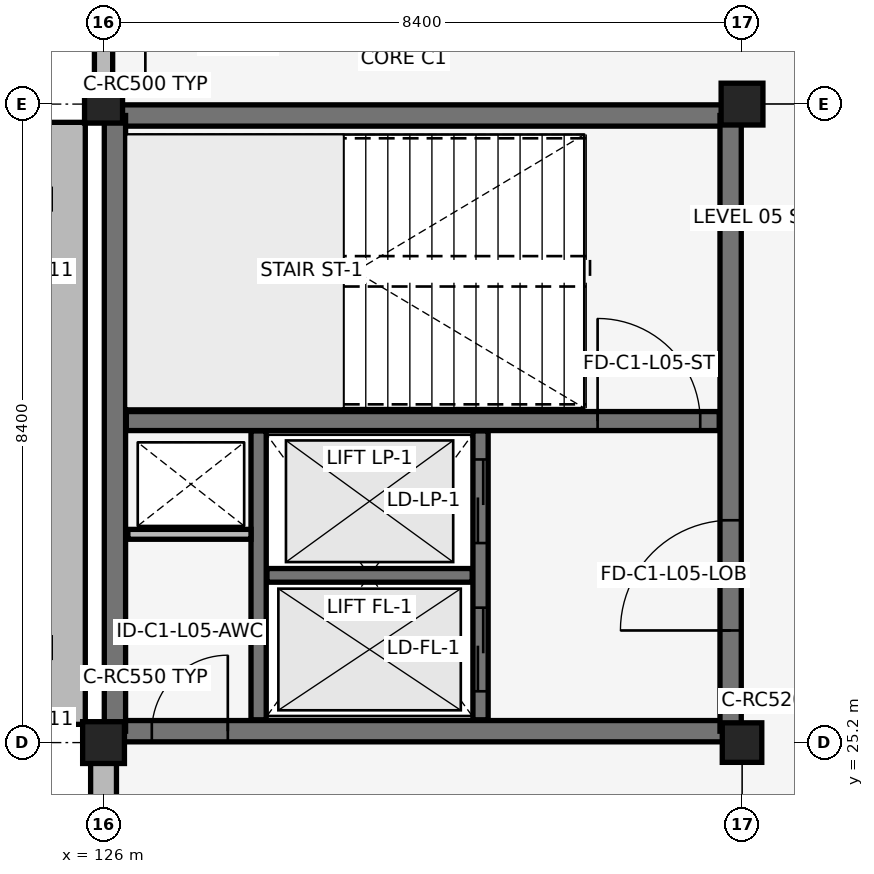
"""IFC4 building model, lengths in metres.
Left out: names, types, materials, properties, quantities, classifications, styles, units other than length and angle.
Written with IfcOpenShell. Run it as: python <this file> out.ifc"""

import sys

from ifc_helpers import new_model, si_unit, direction, frame, frame_2d, origin, origin_2d, place, context, subcontext, project, spatial, rectangle, extrude, element, fill, save


model = new_model("IFC4")
c1 = context("Model", 3, precision=1e-05, world=origin(), true_north=direction((0.0, 1.0)))
c2 = subcontext(c1, "Body", "Model", "MODEL_VIEW")
j1 = project(units=[si_unit("LENGTHUNIT", "METRE"), si_unit("PLANEANGLEUNIT", "RADIAN")], contexts=[c1])
p1 = place(None, origin())
s1 = spatial("IfcSite", under=j1, at=p1, CompositionType="ELEMENT")
p2 = place(p1, origin())
s2 = spatial("IfcBuilding", under=s1, at=p2, CompositionType="ELEMENT")
p3 = place(p2, frame((0.0, 0.0, 22.1)))
s3 = spatial("IfcBuildingStorey", under=s2, at=p3, CompositionType="ELEMENT", Elevation=22.1)
p4 = place(p3, frame((126.15, 25.35, 0.0), z_axis=(0.0, 0.0, 1.0), x_axis=(1.0, 0.0, 0.0)))
e1 = element("IfcWall", 1, at=p4, inside=s3, PredefinedType="SHEAR", context=c2, shape_type="SweptSolid", body=[
    extrude(rectangle(XDim=8.1, YDim=0.28, at=frame_2d((4.05, 0.0))), origin(), (0.0, 0.0, 1.0), 3.78),
])
p5 = place(p4, frame((0.485, 0.0, 0.0)))
e2 = element("IfcOpeningElement", 2, at=p5, cuts=e1, PredefinedType="OPENING", context=c2, shape_type="SweptSolid", body=[
    extrude(rectangle(XDim=1.0, YDim=2.15, at=frame_2d((0.5, 1.075))), frame((0.0, 0.15, 0.0), z_axis=(0.0, -1.0, 0.0), x_axis=(1.0, 0.0, 0.0)), (0.0, 0.0, 1.0), 0.3),
])
p6 = place(p3, frame((126.15, 33.45, 0.0), z_axis=(0.0, 0.0, 1.0), x_axis=(1.0, 0.0, 0.0)))
e3 = element("IfcWall", 3, at=p6, inside=s3, PredefinedType="SHEAR", context=c2, shape_type="SweptSolid", body=[
    extrude(rectangle(XDim=8.1, YDim=0.28, at=frame_2d((4.05, 0.0))), origin(), (0.0, 0.0, 1.0), 3.78),
])
p7 = place(p3, frame((126.15, 25.35, 0.0), z_axis=(0.0, 0.0, 1.0), x_axis=(0.0, 1.0, 0.0)))
e4 = element("IfcWall", 4, at=p7, inside=s3, PredefinedType="SHEAR", context=c2, shape_type="SweptSolid", body=[
    extrude(rectangle(XDim=8.1, YDim=0.28, at=frame_2d((4.05, 0.0))), origin(), (0.0, 0.0, 1.0), 3.78),
])
p8 = place(p3, frame((134.25, 25.35, 0.0), z_axis=(0.0, 0.0, 1.0), x_axis=(0.0, 1.0, 0.0)))
e5 = element("IfcWall", 5, at=p8, inside=s3, PredefinedType="SHEAR", context=c2, shape_type="SweptSolid", body=[
    extrude(rectangle(XDim=8.1, YDim=0.28, at=frame_2d((4.05, 0.0))), origin(), (0.0, 0.0, 1.0), 3.78),
])
p9 = place(p8, frame((1.325, 0.0, 0.0)))
e6 = element("IfcOpeningElement", 6, at=p9, cuts=e5, PredefinedType="OPENING", context=c2, shape_type="SweptSolid", body=[
    extrude(rectangle(XDim=1.45, YDim=2.15, at=frame_2d((0.725, 1.075))), frame((0.0, 0.15, 0.0), z_axis=(0.0, -1.0, 0.0), x_axis=(1.0, 0.0, 0.0)), (0.0, 0.0, 1.0), 0.3),
])
p10 = place(p3, frame((126.3, 29.43, 0.0), z_axis=(0.0, 0.0, 1.0), x_axis=(1.0, 0.0, 0.0)))
e7 = element("IfcWall", 7, at=p10, inside=s3, PredefinedType="SHEAR", context=c2, shape_type="SweptSolid", body=[
    extrude(rectangle(XDim=7.8, YDim=0.25, at=frame_2d((3.9, 0.0))), origin(), (0.0, 0.0, 1.0), 3.78),
])
p11 = place(p10, frame((6.2, 0.0, 0.0)))
e8 = element("IfcOpeningElement", 8, at=p11, cuts=e7, PredefinedType="OPENING", context=c2, shape_type="SweptSolid", body=[
    extrude(rectangle(XDim=1.35, YDim=2.15, at=frame_2d((0.675, 1.075))), frame((0.0, 0.135, 0.0), z_axis=(0.0, -1.0, 0.0), x_axis=(1.0, 0.0, 0.0)), (0.0, 0.0, 1.0), 0.27),
])
p12 = place(p3, frame((126.0, 25.2, 0.0), z_axis=(0.0, 0.0, 1.0), x_axis=(1.0, 0.0, 0.0)))
e9 = element("IfcColumn", 9, at=p12, inside=s3, PredefinedType="COLUMN", context=c2, shape_type="SweptSolid", body=[
    extrude(rectangle(XDim=0.55, YDim=0.55, at=origin_2d()), origin(), (0.0, 0.0, 1.0), 3.78),
])
p13 = place(p3, frame((126.0, 33.6, 0.0), z_axis=(0.0, 0.0, 1.0), x_axis=(1.0, 0.0, 0.0)))
e10 = element("IfcColumn", 10, at=p13, inside=s3, PredefinedType="COLUMN", context=c2, shape_type="SweptSolid", body=[
    extrude(rectangle(XDim=0.5, YDim=0.5, at=origin_2d()), origin(), (0.0, 0.0, 1.0), 3.78),
])
p14 = place(p3, frame((134.4, 25.2, 0.0), z_axis=(0.0, 0.0, 1.0), x_axis=(1.0, 0.0, 0.0)))
e11 = element("IfcColumn", 11, at=p14, inside=s3, PredefinedType="COLUMN", context=c2, shape_type="SweptSolid", body=[
    extrude(rectangle(XDim=0.52, YDim=0.52, at=origin_2d()), origin(), (0.0, 0.0, 1.0), 3.78),
])
p15 = place(p3, frame((134.4, 33.6, 0.0), z_axis=(0.0, 0.0, 1.0), x_axis=(1.0, 0.0, 0.0)))
e12 = element("IfcColumn", 12, at=p15, inside=s3, PredefinedType="COLUMN", context=c2, shape_type="SweptSolid", body=[
    extrude(rectangle(XDim=0.55, YDim=0.55, at=origin_2d()), origin(), (0.0, 0.0, 1.0), 3.78),
])
p16 = place(p3, frame((126.0, 17.035, 0.0), z_axis=(0.0, 0.0, 1.0), x_axis=(0.0, 1.0, 0.0)))
e13 = element("IfcWall", 13, at=p16, inside=s3, PredefinedType="SOLIDWALL", context=c2, shape_type="SweptSolid", body=[
    extrude(rectangle(XDim=7.905, YDim=0.34, at=frame_2d((3.953, 0.0))), origin(), (0.0, 0.0, 1.0), 3.18),
])
p17 = place(p16, frame((1.127, 0.0, 0.7)))
e14 = element("IfcOpeningElement", 14, at=p17, cuts=e13, PredefinedType="OPENING", context=c2, shape_type="SweptSolid", body=[
    extrude(rectangle(XDim=0.75, YDim=2.1, at=frame_2d((0.375, 1.05))), frame((0.0, 0.18, 0.0), z_axis=(0.0, -1.0, 0.0), x_axis=(1.0, 0.0, 0.0)), (0.0, 0.0, 1.0), 0.36),
])
p18 = place(p16, frame((2.708, 0.0, 0.7)))
e15 = element("IfcOpeningElement", 15, at=p18, cuts=e13, PredefinedType="OPENING", context=c2, shape_type="SweptSolid", body=[
    extrude(rectangle(XDim=0.75, YDim=2.1, at=frame_2d((0.375, 1.05))), frame((0.0, 0.18, 0.0), z_axis=(0.0, -1.0, 0.0), x_axis=(1.0, 0.0, 0.0)), (0.0, 0.0, 1.0), 0.36),
])
p19 = place(p16, frame((4.447, 0.0, 0.7)))
e16 = element("IfcOpeningElement", 16, at=p19, cuts=e13, PredefinedType="OPENING", context=c2, shape_type="SweptSolid", body=[
    extrude(rectangle(XDim=0.75, YDim=2.1, at=frame_2d((0.375, 1.05))), frame((0.0, 0.18, 0.0), z_axis=(0.0, -1.0, 0.0), x_axis=(1.0, 0.0, 0.0)), (0.0, 0.0, 1.0), 0.36),
])
p20 = place(p16, frame((6.028, 0.0, 0.7)))
e17 = element("IfcOpeningElement", 17, at=p20, cuts=e13, PredefinedType="OPENING", context=c2, shape_type="SweptSolid", body=[
    extrude(rectangle(XDim=0.75, YDim=2.1, at=frame_2d((0.375, 1.05))), frame((0.0, 0.18, 0.0), z_axis=(0.0, -1.0, 0.0), x_axis=(1.0, 0.0, 0.0)), (0.0, 0.0, 1.0), 0.36),
])
p21 = place(p3, frame((125.52, 25.44, 0.0), z_axis=(0.0, 0.0, 1.0), x_axis=(0.0, 1.0, 0.0)))
e18 = element("IfcWall", 18, at=p21, inside=s3, PredefinedType="SOLIDWALL", context=c2, shape_type="SweptSolid", body=[
    extrude(rectangle(XDim=7.92, YDim=0.48, at=frame_2d((3.96, 0.0))), origin(), (0.0, 0.0, 1.0), 4.08),
])
p22 = place(p3, frame((126.0, 33.835, 0.0), z_axis=(0.0, 0.0, 1.0), x_axis=(0.0, 1.0, 0.0)))
e19 = element("IfcWall", 19, at=p22, inside=s3, PredefinedType="SOLIDWALL", context=c2, shape_type="SweptSolid", body=[
    extrude(rectangle(XDim=7.905, YDim=0.24, at=frame_2d((3.953, 0.0))), origin(), (0.0, 0.0, 1.0), 3.18),
])
p23 = place(p22, frame((0.811, 0.0, 0.35)))
e20 = element("IfcOpeningElement", 20, at=p23, cuts=e19, PredefinedType="OPENING", context=c2, shape_type="SweptSolid", body=[
    extrude(rectangle(XDim=0.44, YDim=1.25, at=frame_2d((0.22, 0.625))), frame((0.0, 0.13, 0.0), z_axis=(0.0, -1.0, 0.0), x_axis=(1.0, 0.0, 0.0)), (0.0, 0.0, 1.0), 0.26),
])
p24 = place(p22, frame((2.271, 0.0, 0.35)))
e21 = element("IfcOpeningElement", 21, at=p24, cuts=e19, PredefinedType="OPENING", context=c2, shape_type="SweptSolid", body=[
    extrude(rectangle(XDim=0.44, YDim=1.25, at=frame_2d((0.22, 0.625))), frame((0.0, 0.13, 0.0), z_axis=(0.0, -1.0, 0.0), x_axis=(1.0, 0.0, 0.0)), (0.0, 0.0, 1.0), 0.26),
])
p25 = place(p22, frame((3.732, 0.0, 0.35)))
e22 = element("IfcOpeningElement", 22, at=p25, cuts=e19, PredefinedType="OPENING", context=c2, shape_type="SweptSolid", body=[
    extrude(rectangle(XDim=0.44, YDim=1.25, at=frame_2d((0.22, 0.625))), frame((0.0, 0.13, 0.0), z_axis=(0.0, -1.0, 0.0), x_axis=(1.0, 0.0, 0.0)), (0.0, 0.0, 1.0), 0.26),
])
p26 = place(p22, frame((5.194, 0.0, 0.35)))
e23 = element("IfcOpeningElement", 23, at=p26, cuts=e19, PredefinedType="OPENING", context=c2, shape_type="SweptSolid", body=[
    extrude(rectangle(XDim=0.44, YDim=1.25, at=frame_2d((0.22, 0.625))), frame((0.0, 0.13, 0.0), z_axis=(0.0, -1.0, 0.0), x_axis=(1.0, 0.0, 0.0)), (0.0, 0.0, 1.0), 0.26),
])
p27 = place(p22, frame((6.655, 0.0, 0.35)))
e24 = element("IfcOpeningElement", 24, at=p27, cuts=e19, PredefinedType="OPENING", context=c2, shape_type="SweptSolid", body=[
    extrude(rectangle(XDim=0.44, YDim=1.25, at=frame_2d((0.22, 0.625))), frame((0.0, 0.13, 0.0), z_axis=(0.0, -1.0, 0.0), x_axis=(1.0, 0.0, 0.0)), (0.0, 0.0, 1.0), 0.26),
])
p28 = place(p3, frame((130.96, 25.5, 0.0), z_axis=(0.0, 0.0, 1.0), x_axis=(0.0, 1.0, 0.0)))
e25 = element("IfcWall", 25, at=p28, inside=s3, PredefinedType="SHEAR", context=c2, shape_type="SweptSolid", body=[
    extrude(rectangle(XDim=3.8, YDim=0.2, at=frame_2d((1.9, 0.0))), origin(), (0.0, 0.0, 1.0), 3.78),
])
p29 = place(p28, frame((0.375, 0.0, 0.0)))
e26 = element("IfcOpeningElement", 26, at=p29, cuts=e25, PredefinedType="OPENING", context=c2, shape_type="SweptSolid", body=[
    extrude(rectangle(XDim=1.1, YDim=2.15, at=frame_2d((0.55, 1.075))), frame((0.0, 0.11, 0.0), z_axis=(0.0, -1.0, 0.0), x_axis=(1.0, 0.0, 0.0)), (0.0, 0.0, 1.0), 0.22),
])
p30 = place(p28, frame((2.325, 0.0, 0.0)))
e27 = element("IfcOpeningElement", 27, at=p30, cuts=e25, PredefinedType="OPENING", context=c2, shape_type="SweptSolid", body=[
    extrude(rectangle(XDim=1.1, YDim=2.15, at=frame_2d((0.55, 1.075))), frame((0.0, 0.11, 0.0), z_axis=(0.0, -1.0, 0.0), x_axis=(1.0, 0.0, 0.0)), (0.0, 0.0, 1.0), 0.22),
])
p31 = place(p3, frame((128.04, 25.5, 0.0), z_axis=(0.0, 0.0, 1.0), x_axis=(0.0, 1.0, 0.0)))
e28 = element("IfcWall", 28, at=p31, inside=s3, PredefinedType="SHEAR", context=c2, shape_type="SweptSolid", body=[
    extrude(rectangle(XDim=3.8, YDim=0.2, at=frame_2d((1.9, 0.0))), origin(), (0.0, 0.0, 1.0), 3.78),
])
p32 = place(p3, frame((128.15, 27.4, 0.0), z_axis=(0.0, 0.0, 1.0), x_axis=(1.0, 0.0, 0.0)))
e29 = element("IfcWall", 29, at=p32, inside=s3, PredefinedType="SHEAR", context=c2, shape_type="SweptSolid", body=[
    extrude(rectangle(XDim=2.7, YDim=0.18, at=frame_2d((1.35, 0.0))), origin(), (0.0, 0.0, 1.0), 3.78),
])
p33 = place(p3, frame((126.32, 27.94, 0.0), z_axis=(0.0, 0.0, 1.0), x_axis=(1.0, 0.0, 0.0)))
e30 = element("IfcWall", 30, at=p33, inside=s3, PredefinedType="PARTITIONING", context=c2, shape_type="SweptSolid", body=[
    extrude(rectangle(XDim=1.62, YDim=0.13, at=frame_2d((0.81, 0.0))), origin(), (0.0, 0.0, 1.0), 3.78),
])
p34 = place(p11, origin())
e31 = element("IfcDoor", 31, at=p34, inside=s3, OperationType="SINGLE_SWING_LEFT", PredefinedType="DOOR", context=c2, shape_type="SweptSolid", body=[
    extrude(rectangle(XDim=1.35, YDim=2.15, at=frame_2d((0.675, 1.075))), frame((0.0, 0.025, 0.0), z_axis=(0.0, -1.0, 0.0), x_axis=(1.0, 0.0, 0.0)), (0.0, 0.0, 1.0), 0.05),
])
fill(e8, e31)
p35 = place(p29, origin())
e32 = element("IfcDoor", 32, at=p35, inside=s3, OperationType="SLIDING_TO_LEFT", PredefinedType="DOOR", context=c2, shape_type="SweptSolid", body=[
    extrude(rectangle(XDim=1.1, YDim=2.15, at=frame_2d((0.55, 1.075))), frame((0.0, 0.025, 0.0), z_axis=(0.0, -1.0, 0.0), x_axis=(1.0, 0.0, 0.0)), (0.0, 0.0, 1.0), 0.05),
])
fill(e26, e32)
p36 = place(p30, origin())
e33 = element("IfcDoor", 33, at=p36, inside=s3, OperationType="SLIDING_TO_LEFT", PredefinedType="DOOR", context=c2, shape_type="SweptSolid", body=[
    extrude(rectangle(XDim=1.1, YDim=2.15, at=frame_2d((0.55, 1.075))), frame((0.0, 0.025, 0.0), z_axis=(0.0, -1.0, 0.0), x_axis=(1.0, 0.0, 0.0)), (0.0, 0.0, 1.0), 0.05),
])
fill(e27, e33)
p37 = place(p9, origin())
e34 = element("IfcDoor", 34, at=p37, inside=s3, OperationType="DOUBLE_DOOR_SINGLE_SWING", PredefinedType="DOOR", context=c2, shape_type="SweptSolid", body=[
    extrude(rectangle(XDim=1.45, YDim=2.15, at=frame_2d((0.725, 1.075))), frame((0.0, 0.025, 0.0), z_axis=(0.0, -1.0, 0.0), x_axis=(1.0, 0.0, 0.0)), (0.0, 0.0, 1.0), 0.05),
])
fill(e6, e34)
p38 = place(p5, origin())
e35 = element("IfcDoor", 35, at=p38, inside=s3, OperationType="SINGLE_SWING_RIGHT", PredefinedType="DOOR", context=c2, shape_type="SweptSolid", body=[
    extrude(rectangle(XDim=1.0, YDim=2.15, at=frame_2d((0.5, 1.075))), frame((0.0, 0.025, 0.0), z_axis=(0.0, -1.0, 0.0), x_axis=(1.0, 0.0, 0.0)), (0.0, 0.0, 1.0), 0.05),
])
fill(e2, e35)
save(model, sys.argv[1])
